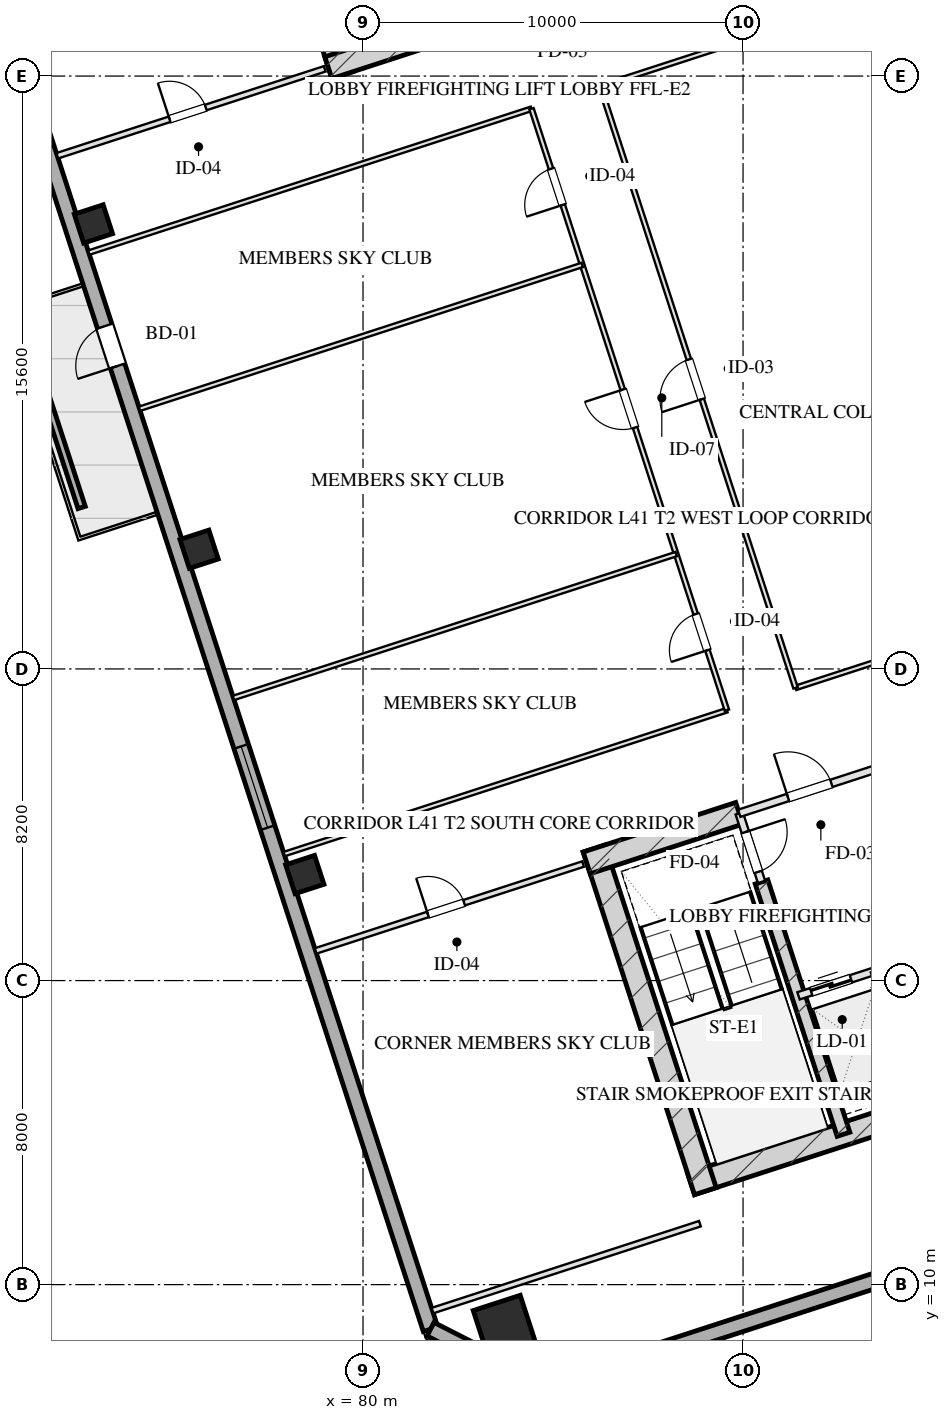
"""IFC4 building model, lengths in metres.
Left out: names, types, materials, properties, quantities, classifications, styles, units other than length and angle.
Written with IfcOpenShell. Run it as: python <this file> out.ifc"""

import sys

from ifc_helpers import new_model, si_unit, direction, frame, frame_2d, origin, origin_2d, place, context, subcontext, project, spatial, rectangle, hollow_rectangle, extrude, element, fill, save


model = new_model("IFC4")
c1 = context("Model", 3, precision=1e-05, world=origin(), true_north=direction((0.0, 1.0)))
c2 = subcontext(c1, "Body", "Model", "MODEL_VIEW")
j1 = project(units=[si_unit("LENGTHUNIT", "METRE"), si_unit("PLANEANGLEUNIT", "RADIAN")], contexts=[c1])
p1 = place(None, origin())
s1 = spatial("IfcSite", under=j1, at=p1, CompositionType="ELEMENT")
p2 = place(p1, origin())
s2 = spatial("IfcBuilding", under=s1, at=p2, CompositionType="ELEMENT")
p3 = place(p2, frame((0.0, 0.0, 156.4)))
s3 = spatial("IfcBuildingStorey", under=s2, at=p3, CompositionType="ELEMENT", Elevation=156.4)
p4 = place(p3, frame((88.63, 12.652, 0.0), z_axis=(0.0, 0.0, 1.0), x_axis=(0.95105714907, 0.309015046886, 0.0)))
e1 = element("IfcWall", 1, at=p4, inside=s3, PredefinedType="SHEAR", context=c2, shape_type="SweptSolid", body=[
    extrude(rectangle(XDim=16.4, YDim=0.6, at=frame_2d((8.2, 0.0))), origin(), (0.0, 0.0, 1.0), 3.45),
])
p5 = place(p3, frame((86.078, 21.475, 0.0), z_axis=(0.0, 0.0, 1.0), x_axis=(0.309017938678, -0.951056209472, 0.0)))
e2 = element("IfcWall", 2, at=p5, inside=s3, PredefinedType="SHEAR", context=c2, shape_type="SweptSolid", body=[
    extrude(rectangle(XDim=9.48, YDim=0.6, at=frame_2d((4.74, 0.0))), origin(), (0.0, 0.0, 1.0), 3.45),
])
p6 = place(p3, frame((90.486, 20.594, 0.0), z_axis=(0.0, 0.0, 1.0), x_axis=(0.309020428229, -0.951055400562, 0.0)))
e3 = element("IfcWall", 3, at=p6, inside=s3, PredefinedType="SHEAR", context=c2, shape_type="SweptSolid", body=[
    extrude(rectangle(XDim=6.98, YDim=0.35, at=frame_2d((3.49, 0.0))), origin(), (0.0, 0.0, 1.0), 3.45),
])
p7 = place(p3, frame((85.886, 21.097, 0.0), z_axis=(0.0, 0.0, 1.0), x_axis=(0.951068073652, 0.308981422225, 0.0)))
e4 = element("IfcWall", 4, at=p7, inside=s3, PredefinedType="SHEAR", context=c2, shape_type="SweptSolid", body=[
    extrude(rectangle(XDim=4.22, YDim=0.6, at=frame_2d((2.11, 0.0))), origin(), (0.0, 0.0, 1.0), 3.45),
])
p8 = place(p3, frame((79.466, 41.828, 0.0), z_axis=(0.0, 0.0, 1.0), x_axis=(-0.309041232772, 0.951048640421, 0.0)))
e5 = element("IfcWall", 5, at=p8, inside=s3, PredefinedType="SHEAR", context=c2, shape_type="SweptSolid", body=[
    extrude(rectangle(XDim=9.48, YDim=0.6, at=frame_2d((4.74, 0.0))), origin(), (0.0, 0.0, 1.0), 3.45),
])
p9 = place(p3, frame((79.087, 42.021, 0.0), z_axis=(0.0, 0.0, 1.0), x_axis=(0.951062550203, 0.3089984233, 0.0)))
e6 = element("IfcWall", 6, at=p9, inside=s3, PredefinedType="SHEAR", context=c2, shape_type="SweptSolid", body=[
    extrude(rectangle(XDim=4.22, YDim=0.6, at=frame_2d((2.11, 0.0))), origin(), (0.0, 0.0, 1.0), 3.45),
])
p10 = place(p3, frame((83.719, 8.901, 0.0), z_axis=(0.0, 0.0, 1.0), x_axis=(0.951056516295, 0.309016994375, 0.0)))
e7 = element("IfcColumn", 7, at=p10, inside=s3, PredefinedType="COLUMN", context=c2, shape_type="SweptSolid", body=[
    extrude(hollow_rectangle(XDim=1.3, YDim=1.3, WallThickness=0.045, at=origin_2d()), origin(), (0.0, 0.0, 1.0), 3.451),
])
for number, where, z_axis, x_axis in (
    (8, (78.468, 20.79, 0.0), (0.0, 0.0, 1.0), (0.951, 0.309, 0.0)),
    (9, (75.687, 29.349, 0.0), (0.0, 0.0, 1.0), (0.951, 0.309, 0.0)),
    (10, (72.906, 37.909, 0.0), (0.0, 0.0, 1.0), (0.951, 0.309, 0.0)),
):
    element("IfcColumn", number, at=place(p3, frame(where, z_axis=z_axis, x_axis=x_axis)), inside=s3, PredefinedType="COLUMN", context=c2, shape_type="SweptSolid", body=[
        extrude(hollow_rectangle(XDim=0.8, YDim=0.8, WallThickness=0.028, at=origin_2d()), origin(), (0.0, 0.0, 1.0), 3.451),
    ])
p11 = place(p3, frame((81.776, 8.827, 0.0), z_axis=(0.0, 0.0, 1.0), x_axis=(-0.309014228706, 0.951057414911, 0.0)))
e11 = element("IfcWall", 11, at=p11, inside=s3, PredefinedType="SOLIDWALL", context=c2, shape_type="SweptSolid", body=[
    extrude(rectangle(XDim=42.8, YDim=0.4, at=frame_2d((21.4, 0.0))), origin(), (0.0, 0.0, 1.0), 2.61),
])
p12 = place(p11, frame((13.875, 0.0, 0.75)))
e12 = element("IfcOpeningElement", 12, at=p12, cuts=e11, PredefinedType="OPENING", context=c2, shape_type="SweptSolid", body=[
    extrude(rectangle(XDim=2.25, YDim=1.46, at=frame_2d((1.125, 0.73))), frame((0.0, 0.21, 0.0), z_axis=(0.0, -1.0, 0.0), x_axis=(1.0, 0.0, 0.0)), (0.0, 0.0, 1.0), 0.42),
])
p13 = place(p11, frame((26.65, 0.0, 0.0)))
e13 = element("IfcOpeningElement", 13, at=p13, cuts=e11, PredefinedType="OPENING", context=c2, shape_type="SweptSolid", body=[
    extrude(rectangle(XDim=1.1, YDim=2.15, at=frame_2d((0.55, 1.075))), frame((0.0, 0.21, 0.0), z_axis=(0.0, -1.0, 0.0), x_axis=(1.0, 0.0, 0.0)), (0.0, 0.0, 1.0), 0.42),
])
p14 = place(p3, frame((109.908, 15.444, 0.0), z_axis=(0.0, 0.0, 1.0), x_axis=(-0.951057580055, -0.30901372044, 0.0)))
e14 = element("IfcWall", 14, at=p14, inside=s3, PredefinedType="SOLIDWALL", context=c2, shape_type="SweptSolid", body=[
    extrude(rectangle(XDim=26.4, YDim=0.4, at=frame_2d((13.2, 0.0))), origin(), (0.0, 0.0, 1.0), 2.61),
])
p15 = place(p3, frame((84.801, 7.286, 0.0), z_axis=(0.0, 0.0, 1.0), x_axis=(-0.891020832027, 0.453962417932, 0.0)))
e15 = element("IfcWall", 15, at=p15, inside=s3, PredefinedType="SOLIDWALL", context=c2, shape_type="SweptSolid", body=[
    extrude(rectangle(XDim=3.394, YDim=0.4, at=frame_2d((1.697, 0.0))), origin(), (0.0, 0.0, 1.0), 2.61),
])
p16 = place(p3, frame((72.596, 30.448, 0.0), z_axis=(0.0, 0.0, 1.0), x_axis=(-0.30900096172, 0.951061725471, 0.0)))
e16 = element("IfcWall", 16, at=p16, inside=s3, PredefinedType="PARAPET", context=c2, shape_type="SweptSolid", body=[
    extrude(rectangle(XDim=4.8, YDim=0.2, at=frame_2d((2.4, 0.0))), origin(), (0.0, 0.0, 1.0), 0.75),
])
p17 = place(p3, frame((89.899, 22.401, 0.0), z_axis=(0.0, 0.0, 1.0), x_axis=(0.308932062672, -0.951084108086, 0.0)))
e17 = element("IfcWall", 17, at=p17, inside=s3, PredefinedType="PARTITIONING", context=c2, shape_type="SweptSolid", body=[
    extrude(rectangle(XDim=1.9, YDim=0.2, at=frame_2d((0.95, 0.0))), origin(), (0.0, 0.0, 1.0), 3.175),
])
p18 = place(p17, frame((0.52, 0.0, 0.0)))
e18 = element("IfcOpeningElement", 18, at=p18, cuts=e17, PredefinedType="OPENING", context=c2, shape_type="SweptSolid", body=[
    extrude(rectangle(XDim=1.1, YDim=2.05, at=frame_2d((0.55, 1.025))), frame((0.0, 0.11, 0.0), z_axis=(0.0, -1.0, 0.0), x_axis=(1.0, 0.0, 0.0)), (0.0, 0.0, 1.0), 0.22),
])
p19 = place(p3, frame((89.899, 22.401, 0.0), z_axis=(0.0, 0.0, 1.0), x_axis=(0.951046716504, 0.309047153403, 0.0)))
e19 = element("IfcWall", 19, at=p19, inside=s3, PredefinedType="PARTITIONING", context=c2, shape_type="SweptSolid", body=[
    extrude(rectangle(XDim=3.83, YDim=0.2, at=frame_2d((1.915, 0.0))), origin(), (0.0, 0.0, 1.0), 3.175),
])
p20 = place(p19, frame((1.35, 0.0, 0.0)))
e20 = element("IfcOpeningElement", 20, at=p20, cuts=e19, PredefinedType="OPENING", context=c2, shape_type="SweptSolid", body=[
    extrude(rectangle(XDim=1.2, YDim=2.05, at=frame_2d((0.6, 1.025))), frame((0.0, 0.11, 0.0), z_axis=(0.0, -1.0, 0.0), x_axis=(1.0, 0.0, 0.0)), (0.0, 0.0, 1.0), 0.22),
])
p21 = place(p3, frame((91.46, 17.598, 0.0), z_axis=(0.0, 0.0, 1.0), x_axis=(0.951062257173, 0.308999325213, 0.0)))
e21 = element("IfcWall", 21, at=p21, inside=s3, PredefinedType="PARTITIONING", context=c2, shape_type="SweptSolid", body=[
    extrude(rectangle(XDim=2.1, YDim=0.2, at=frame_2d((1.05, 0.0))), origin(), (0.0, 0.0, 1.0), 3.175),
])
p22 = place(p21, frame((0.35, 0.0, 0.0)))
e22 = element("IfcOpeningElement", 22, at=p22, cuts=e21, PredefinedType="OPENING", context=c2, shape_type="SweptSolid", body=[
    extrude(rectangle(XDim=1.1, YDim=2.05, at=frame_2d((0.55, 1.025))), frame((0.0, 0.11, 0.0), z_axis=(0.0, -1.0, 0.0), x_axis=(1.0, 0.0, 0.0)), (0.0, 0.0, 1.0), 0.22),
])
p23 = place(p3, frame((93.457, 18.247, 0.0), z_axis=(0.0, 0.0, 1.0), x_axis=(0.3089935693, -0.951064127245, 0.0)))
e23 = element("IfcWall", 23, at=p23, inside=s3, PredefinedType="PARTITIONING", context=c2, shape_type="SweptSolid", body=[
    extrude(rectangle(XDim=3.7, YDim=0.2, at=frame_2d((1.85, 0.0))), origin(), (0.0, 0.0, 1.0), 3.175),
])
p24 = place(p3, frame((81.828, 9.316, 0.0), z_axis=(0.0, 0.0, 1.0), x_axis=(0.95105128112, 0.309033106124, 0.0)))
e24 = element("IfcWall", 24, at=p24, inside=s3, PredefinedType="PARTITIONING", context=c2, shape_type="SweptSolid", body=[
    extrude(rectangle(XDim=7.4, YDim=0.15, at=frame_2d((3.7, 0.0))), origin(), (0.0, 0.0, 1.0), 3.175),
])
p25 = place(p3, frame((78.753, 18.78, 0.0), z_axis=(0.0, 0.0, 1.0), x_axis=(0.951060977215, 0.309003264738, 0.0)))
e25 = element("IfcWall", 25, at=p25, inside=s3, PredefinedType="PARTITIONING", context=c2, shape_type="SweptSolid", body=[
    extrude(rectangle(XDim=7.4, YDim=0.15, at=frame_2d((3.7, 0.0))), origin(), (0.0, 0.0, 1.0), 3.175),
])
p26 = place(p25, frame((3.108, 0.0, 0.0)))
e26 = element("IfcOpeningElement", 26, at=p26, cuts=e25, PredefinedType="OPENING", context=c2, shape_type="SweptSolid", body=[
    extrude(rectangle(XDim=1.0, YDim=2.05, at=frame_2d((0.5, 1.025))), frame((0.0, 0.085, 0.0), z_axis=(0.0, -1.0, 0.0), x_axis=(1.0, 0.0, 0.0)), (0.0, 0.0, 1.0), 0.17),
])
p27 = place(p3, frame((71.955, 39.703, 0.0), z_axis=(0.0, 0.0, 1.0), x_axis=(0.951060977215, 0.309003264738, 0.0)))
e27 = element("IfcWall", 27, at=p27, inside=s3, PredefinedType="PARTITIONING", context=c2, shape_type="SweptSolid", body=[
    extrude(rectangle(XDim=7.4, YDim=0.15, at=frame_2d((3.7, 0.0))), origin(), (0.0, 0.0, 1.0), 3.175),
])
p28 = place(p27, frame((3.108, 0.0, 0.0)))
e28 = element("IfcOpeningElement", 28, at=p28, cuts=e27, PredefinedType="OPENING", context=c2, shape_type="SweptSolid", body=[
    extrude(rectangle(XDim=1.0, YDim=2.05, at=frame_2d((0.5, 1.025))), frame((0.0, 0.085, 0.0), z_axis=(0.0, -1.0, 0.0), x_axis=(1.0, 0.0, 0.0)), (0.0, 0.0, 1.0), 0.17),
])
p29 = place(p3, frame((77.925, 21.328, 0.0), z_axis=(0.0, 0.0, 1.0), x_axis=(0.95105749975, 0.309013967595, 0.0)))
e29 = element("IfcWall", 29, at=p29, inside=s3, PredefinedType="PARTITIONING", context=c2, shape_type="SweptSolid", body=[
    extrude(rectangle(XDim=12.25, YDim=0.12, at=frame_2d((6.125, 0.0))), origin(), (0.0, 0.0, 1.0), 3.175),
])
p30 = place(p3, frame((91.382, 25.701, 0.0), z_axis=(0.0, 0.0, 1.0), x_axis=(0.951061683147, 0.309001091988, 0.0)))
e30 = element("IfcWall", 30, at=p30, inside=s3, PredefinedType="PARTITIONING", context=c2, shape_type="SweptSolid", body=[
    extrude(rectangle(XDim=8.25, YDim=0.12, at=frame_2d((4.125, 0.0))), origin(), (0.0, 0.0, 1.0), 3.175),
])
p31 = place(p3, frame((72.783, 37.154, 0.0), z_axis=(0.0, 0.0, 1.0), x_axis=(0.9510516424, 0.30903199428, 0.0)))
e31 = element("IfcWall", 31, at=p31, inside=s3, PredefinedType="PARTITIONING", context=c2, shape_type="SweptSolid", body=[
    extrude(rectangle(XDim=12.25, YDim=0.12, at=frame_2d((6.125, 0.0))), origin(), (0.0, 0.0, 1.0), 3.175),
])
p32 = place(p3, frame((86.24, 41.527, 0.0), z_axis=(0.0, 0.0, 1.0), x_axis=(0.951058857521, 0.309009788731, 0.0)))
e32 = element("IfcWall", 32, at=p32, inside=s3, PredefinedType="PARTITIONING", context=c2, shape_type="SweptSolid", body=[
    extrude(rectangle(XDim=8.25, YDim=0.12, at=frame_2d((4.125, 0.0))), origin(), (0.0, 0.0, 1.0), 3.175),
])
p33 = place(p3, frame((89.575, 25.114, 0.0), z_axis=(0.0, 0.0, 1.0), x_axis=(-0.30901773025, 0.951056277195, 0.0)))
e33 = element("IfcWall", 33, at=p33, inside=s3, PredefinedType="PARTITIONING", context=c2, shape_type="SweptSolid", body=[
    extrude(rectangle(XDim=16.64, YDim=0.12, at=frame_2d((8.32, 0.0))), origin(), (0.0, 0.0, 1.0), 3.175),
])
p34 = place(p33, frame((1.66, 0.0, 0.0)))
e34 = element("IfcOpeningElement", 34, at=p34, cuts=e33, PredefinedType="OPENING", context=c2, shape_type="SweptSolid", body=[
    extrude(rectangle(XDim=1.0, YDim=2.05, at=frame_2d((0.5, 1.025))), frame((0.0, 0.07, 0.0), z_axis=(0.0, -1.0, 0.0), x_axis=(1.0, 0.0, 0.0)), (0.0, 0.0, 1.0), 0.14),
])
p35 = place(p33, frame((7.82, 0.0, 0.0)))
e35 = element("IfcOpeningElement", 35, at=p35, cuts=e33, PredefinedType="OPENING", context=c2, shape_type="SweptSolid", body=[
    extrude(rectangle(XDim=1.05, YDim=2.05, at=frame_2d((0.525, 1.025))), frame((0.0, 0.07, 0.0), z_axis=(0.0, -1.0, 0.0), x_axis=(1.0, 0.0, 0.0)), (0.0, 0.0, 1.0), 0.14),
])
p36 = place(p33, frame((13.98, 0.0, 0.0)))
e36 = element("IfcOpeningElement", 36, at=p36, cuts=e33, PredefinedType="OPENING", context=c2, shape_type="SweptSolid", body=[
    extrude(rectangle(XDim=1.0, YDim=2.05, at=frame_2d((0.5, 1.025))), frame((0.0, 0.07, 0.0), z_axis=(0.0, -1.0, 0.0), x_axis=(1.0, 0.0, 0.0)), (0.0, 0.0, 1.0), 0.14),
])
p37 = place(p3, frame((91.382, 25.701, 0.0), z_axis=(0.0, 0.0, 1.0), x_axis=(-0.309004459387, 0.951060589068, 0.0)))
e37 = element("IfcWall", 37, at=p37, inside=s3, PredefinedType="PARTITIONING", context=c2, shape_type="SweptSolid", body=[
    extrude(rectangle(XDim=16.64, YDim=0.12, at=frame_2d((8.32, 0.0))), origin(), (0.0, 0.0, 1.0), 3.175),
])
p38 = place(p37, frame((7.987, 0.0, 0.0)))
e38 = element("IfcOpeningElement", 38, at=p38, cuts=e37, PredefinedType="OPENING", context=c2, shape_type="SweptSolid", body=[
    extrude(rectangle(XDim=1.1, YDim=2.05, at=frame_2d((0.55, 1.025))), frame((0.0, 0.07, 0.0), z_axis=(0.0, -1.0, 0.0), x_axis=(1.0, 0.0, 0.0)), (0.0, 0.0, 1.0), 0.14),
])
for number, where, z_axis, x_axis in (
    (39, (76.59, 25.437, 0.0), (0.0, 0.0, 1.0), (0.951, 0.309, 0.0)),
    (40, (74.118, 33.045, 0.0), (0.0, 0.0, 1.0), (0.951, 0.309, 0.0)),
):
    element("IfcWall", number, at=place(p3, frame(where, z_axis=z_axis, x_axis=x_axis)), inside=s3, PredefinedType="PARTITIONING", context=c2, shape_type="SweptSolid", body=[
        extrude(rectangle(XDim=12.25, YDim=0.12, at=frame_2d((6.125, 0.0))), origin(), (0.0, 0.0, 1.0), 3.175),
    ])
p39 = place(p12, origin())
e41 = element("IfcWindow", 41, at=p39, inside=s3, PartitioningType="TRIPLE_PANEL_VERTICAL", PredefinedType="WINDOW", context=c2, shape_type="SweptSolid", body=[
    extrude(rectangle(XDim=2.25, YDim=1.46, at=frame_2d((1.125, 0.73))), frame((0.0, 0.03, 0.0), z_axis=(0.0, -1.0, 0.0), x_axis=(1.0, 0.0, 0.0)), (0.0, 0.0, 1.0), 0.06),
])
fill(e12, e41)
p40 = place(p13, origin())
e42 = element("IfcDoor", 42, at=p40, inside=s3, OperationType="SINGLE_SWING_LEFT", PredefinedType="DOOR", context=c2, shape_type="SweptSolid", body=[
    extrude(rectangle(XDim=1.1, YDim=2.15, at=frame_2d((0.55, 1.075))), frame((0.0, 0.025, 0.0), z_axis=(0.0, -1.0, 0.0), x_axis=(1.0, 0.0, 0.0)), (0.0, 0.0, 1.0), 0.05),
])
fill(e13, e42)
p41 = place(p18, origin())
e43 = element("IfcDoor", 43, at=p41, inside=s3, OperationType="SINGLE_SWING_LEFT", PredefinedType="DOOR", context=c2, shape_type="SweptSolid", body=[
    extrude(rectangle(XDim=1.1, YDim=2.05, at=frame_2d((0.55, 1.025))), frame((0.0, 0.025, 0.0), z_axis=(0.0, -1.0, 0.0), x_axis=(1.0, 0.0, 0.0)), (0.0, 0.0, 1.0), 0.05),
])
fill(e18, e43)
p42 = place(p20, origin())
e44 = element("IfcDoor", 44, at=p42, inside=s3, OperationType="SINGLE_SWING_LEFT", PredefinedType="DOOR", context=c2, shape_type="SweptSolid", body=[
    extrude(rectangle(XDim=1.2, YDim=2.05, at=frame_2d((0.6, 1.025))), frame((0.0, 0.025, 0.0), z_axis=(0.0, -1.0, 0.0), x_axis=(1.0, 0.0, 0.0)), (0.0, 0.0, 1.0), 0.05),
])
fill(e20, e44)
p43 = place(p22, origin())
e45 = element("IfcDoor", 45, at=p43, inside=s3, OperationType="DOUBLE_DOOR_SLIDING", PredefinedType="DOOR", context=c2, shape_type="SweptSolid", body=[
    extrude(rectangle(XDim=1.1, YDim=2.05, at=frame_2d((0.55, 1.025))), frame((0.0, 0.025, 0.0), z_axis=(0.0, -1.0, 0.0), x_axis=(1.0, 0.0, 0.0)), (0.0, 0.0, 1.0), 0.05),
])
fill(e22, e45)
p44 = place(p26, origin())
e46 = element("IfcDoor", 46, at=p44, inside=s3, OperationType="SINGLE_SWING_LEFT", PredefinedType="DOOR", context=c2, shape_type="SweptSolid", body=[
    extrude(rectangle(XDim=1.0, YDim=2.05, at=frame_2d((0.5, 1.025))), frame((0.0, 0.025, 0.0), z_axis=(0.0, -1.0, 0.0), x_axis=(1.0, 0.0, 0.0)), (0.0, 0.0, 1.0), 0.05),
])
fill(e26, e46)
p45 = place(p28, origin())
e47 = element("IfcDoor", 47, at=p45, inside=s3, OperationType="SINGLE_SWING_LEFT", PredefinedType="DOOR", context=c2, shape_type="SweptSolid", body=[
    extrude(rectangle(XDim=1.0, YDim=2.05, at=frame_2d((0.5, 1.025))), frame((0.0, 0.025, 0.0), z_axis=(0.0, -1.0, 0.0), x_axis=(1.0, 0.0, 0.0)), (0.0, 0.0, 1.0), 0.05),
])
fill(e28, e47)
p46 = place(p34, origin())
e48 = element("IfcDoor", 48, at=p46, inside=s3, OperationType="SINGLE_SWING_LEFT", PredefinedType="DOOR", context=c2, shape_type="SweptSolid", body=[
    extrude(rectangle(XDim=1.0, YDim=2.05, at=frame_2d((0.5, 1.025))), frame((0.0, 0.025, 0.0), z_axis=(0.0, -1.0, 0.0), x_axis=(1.0, 0.0, 0.0)), (0.0, 0.0, 1.0), 0.05),
])
fill(e34, e48)
p47 = place(p35, origin())
e49 = element("IfcDoor", 49, at=p47, inside=s3, OperationType="SINGLE_SWING_RIGHT", PredefinedType="DOOR", context=c2, shape_type="SweptSolid", body=[
    extrude(rectangle(XDim=1.05, YDim=2.05, at=frame_2d((0.525, 1.025))), frame((0.0, 0.025, 0.0), z_axis=(0.0, -1.0, 0.0), x_axis=(1.0, 0.0, 0.0)), (0.0, 0.0, 1.0), 0.05),
])
fill(e35, e49)
p48 = place(p36, origin())
e50 = element("IfcDoor", 50, at=p48, inside=s3, OperationType="SINGLE_SWING_LEFT", PredefinedType="DOOR", context=c2, shape_type="SweptSolid", body=[
    extrude(rectangle(XDim=1.0, YDim=2.05, at=frame_2d((0.5, 1.025))), frame((0.0, 0.025, 0.0), z_axis=(0.0, -1.0, 0.0), x_axis=(1.0, 0.0, 0.0)), (0.0, 0.0, 1.0), 0.05),
])
fill(e36, e50)
p49 = place(p38, origin())
e51 = element("IfcDoor", 51, at=p49, inside=s3, OperationType="SINGLE_SWING_LEFT", PredefinedType="DOOR", context=c2, shape_type="SweptSolid", body=[
    extrude(rectangle(XDim=1.1, YDim=2.05, at=frame_2d((0.55, 1.025))), frame((0.0, 0.025, 0.0), z_axis=(0.0, -1.0, 0.0), x_axis=(1.0, 0.0, 0.0)), (0.0, 0.0, 1.0), 0.05),
])
fill(e38, e51)
save(model, sys.argv[1])
